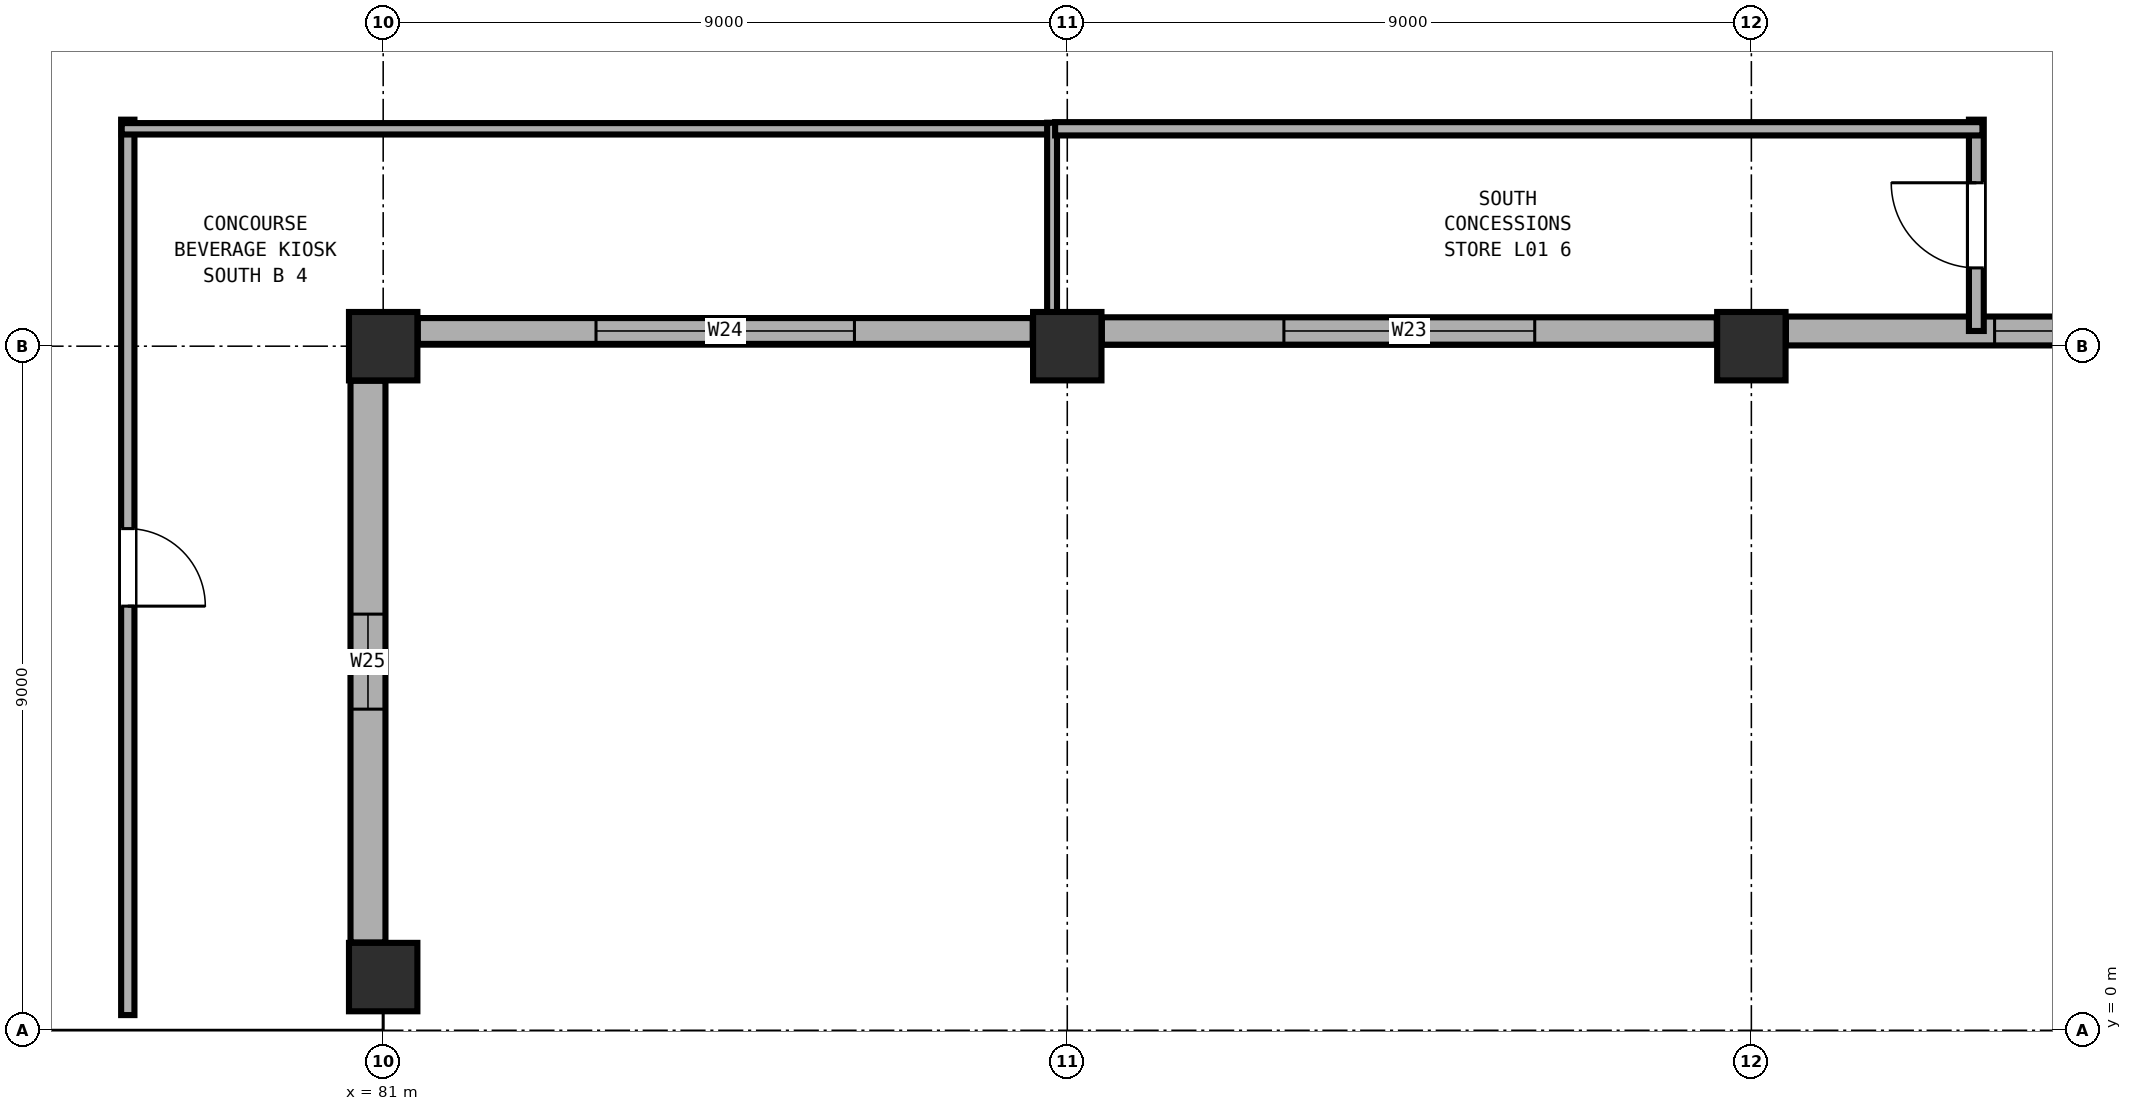
"""IFC4 building model, lengths in metres.
Left out: names, types, materials, properties, quantities, classifications, styles, units other than length and angle.
Written with IfcOpenShell. Run it as: python <this file> out.ifc"""

import sys

from ifc_helpers import new_model, si_unit, direction, frame, frame_2d, origin, origin_2d, place, context, subcontext, project, spatial, rectangle, extrude, element, fill, save


model = new_model("IFC4")
c1 = context("Model", 3, precision=1e-05, world=origin(), true_north=direction((0.0, 1.0)))
c2 = subcontext(c1, "Body", "Model", "MODEL_VIEW")
j1 = project(units=[si_unit("LENGTHUNIT", "METRE"), si_unit("PLANEANGLEUNIT", "RADIAN")], contexts=[c1])
p1 = place(None, origin())
s1 = spatial("IfcSite", under=j1, at=p1, CompositionType="ELEMENT")
p2 = place(p1, origin())
s2 = spatial("IfcBuilding", under=s1, at=p2, CompositionType="ELEMENT")
p3 = place(p2, frame((0.0, 0.0, 4.8)))
s3 = spatial("IfcBuildingStorey", under=s2, at=p3, CompositionType="ELEMENT", Elevation=4.8)
for number, where, z_axis, x_axis in (
    (1, (81.0, 0.7, 0.0), (0.0, 0.0, 1.0), (1.0, 0.0, 0.0)),
    (2, (81.0, 9.0, 0.0), (0.0, 0.0, 1.0), (1.0, 0.0, 0.0)),
    (3, (90.0, 9.0, 0.0), (0.0, 0.0, 1.0), (1.0, 0.0, 0.0)),
    (4, (99.0, 9.0, 0.0), (0.0, 0.0, 1.0), (1.0, 0.0, 0.0)),
):
    element("IfcColumn", number, at=place(p3, frame(where, z_axis=z_axis, x_axis=x_axis)), inside=s3, PredefinedType="COLUMN", context=c2, shape_type="SweptSolid", body=[
        extrude(rectangle(XDim=0.9, YDim=0.9, at=origin_2d()), origin(), (0.0, 0.0, 1.0), 4.8),
    ])
p4 = place(p3, frame((107.545, 9.2, 0.0), z_axis=(0.0, 0.0, 1.0), x_axis=(-1.0, 0.0, 0.0)))
e5 = element("IfcWall", 5, at=p4, inside=s3, PredefinedType="SOLIDWALL", context=c2, shape_type="SweptSolid", body=[
    extrude(rectangle(XDim=8.09, YDim=0.38, at=frame_2d((4.045, 0.0))), origin(), (0.0, 0.0, 1.0), 3.58),
])
p5 = place(p4, frame((2.145, 0.0, 0.9)))
e6 = element("IfcOpeningElement", 6, at=p5, cuts=e5, PredefinedType="OPENING", context=c2, shape_type="SweptSolid", body=[
    extrude(rectangle(XDim=3.2, YDim=2.05, at=frame_2d((1.6, 1.025))), frame((0.0, 0.2, 0.0), z_axis=(0.0, -1.0, 0.0), x_axis=(1.0, 0.0, 0.0)), (0.0, 0.0, 1.0), 0.4),
])
p6 = place(p3, frame((98.545, 9.2, 0.0), z_axis=(0.0, 0.0, 1.0), x_axis=(-1.0, 0.0, 0.0)))
e7 = element("IfcWall", 7, at=p6, inside=s3, PredefinedType="SOLIDWALL", context=c2, shape_type="SweptSolid", body=[
    extrude(rectangle(XDim=8.09, YDim=0.36, at=frame_2d((4.045, 0.0))), origin(), (0.0, 0.0, 1.0), 3.58),
])
p7 = place(p6, frame((2.395, 0.0, 0.9)))
e8 = element("IfcOpeningElement", 8, at=p7, cuts=e7, PredefinedType="OPENING", context=c2, shape_type="SweptSolid", body=[
    extrude(rectangle(XDim=3.3, YDim=2.0, at=frame_2d((1.65, 1.0))), frame((0.0, 0.19, 0.0), z_axis=(0.0, -1.0, 0.0), x_axis=(1.0, 0.0, 0.0)), (0.0, 0.0, 1.0), 0.38),
])
p8 = place(p3, frame((89.545, 9.2, 0.0), z_axis=(0.0, 0.0, 1.0), x_axis=(-1.0, 0.0, 0.0)))
e9 = element("IfcWall", 9, at=p8, inside=s3, PredefinedType="SOLIDWALL", context=c2, shape_type="SweptSolid", body=[
    extrude(rectangle(XDim=8.09, YDim=0.34, at=frame_2d((4.045, 0.0))), origin(), (0.0, 0.0, 1.0), 3.58),
])
p9 = place(p8, frame((2.345, 0.0, 0.9)))
e10 = element("IfcOpeningElement", 10, at=p9, cuts=e9, PredefinedType="OPENING", context=c2, shape_type="SweptSolid", body=[
    extrude(rectangle(XDim=3.4, YDim=1.95, at=frame_2d((1.7, 0.975))), frame((0.0, 0.18, 0.0), z_axis=(0.0, -1.0, 0.0), x_axis=(1.0, 0.0, 0.0)), (0.0, 0.0, 1.0), 0.36),
])
p10 = place(p3, frame((80.8, 8.545, 0.0), z_axis=(0.0, 0.0, 1.0), x_axis=(0.0, -1.0, 0.0)))
e11 = element("IfcWall", 11, at=p10, inside=s3, PredefinedType="SOLIDWALL", context=c2, shape_type="SweptSolid", body=[
    extrude(rectangle(XDim=7.39, YDim=0.46, at=frame_2d((3.695, 0.0))), origin(), (0.0, 0.0, 1.0), 3.58),
])
p11 = place(p10, frame((3.07, 0.0, 0.9)))
e12 = element("IfcOpeningElement", 12, at=p11, cuts=e11, PredefinedType="OPENING", context=c2, shape_type="SweptSolid", body=[
    extrude(rectangle(XDim=1.25, YDim=1.8, at=frame_2d((0.625, 0.9))), frame((0.0, 0.24, 0.0), z_axis=(0.0, -1.0, 0.0), x_axis=(1.0, 0.0, 0.0)), (0.0, 0.0, 1.0), 0.48),
])
p12 = place(p3, frame((80.545, 0.2, 0.0), z_axis=(0.0, 0.0, 1.0), x_axis=(-1.0, 0.0, 0.0)))
e13 = element("IfcWall", 13, at=p12, inside=s3, PredefinedType="SOLIDWALL", context=c2, shape_type="SweptSolid", body=[
    extrude(rectangle(XDim=8.09, YDim=0.42, at=frame_2d((4.045, 0.0))), origin(), (0.0, 0.0, 1.0), 3.58),
])
p13 = place(p12, frame((3.32, 0.0, 0.9)))
e14 = element("IfcOpeningElement", 14, at=p13, cuts=e13, PredefinedType="OPENING", context=c2, shape_type="SweptSolid", body=[
    extrude(rectangle(XDim=1.45, YDim=1.85, at=frame_2d((0.725, 0.925))), frame((0.0, 0.22, 0.0), z_axis=(0.0, -1.0, 0.0), x_axis=(1.0, 0.0, 0.0)), (0.0, 0.0, 1.0), 0.44),
])
p14 = place(p3, frame((77.64, 11.98, 0.0), z_axis=(0.0, 0.0, 1.0), x_axis=(0.0, -1.0, 0.0)))
e15 = element("IfcWall", 15, at=p14, inside=s3, PredefinedType="PARTITIONING", context=c2, shape_type="SweptSolid", body=[
    extrude(rectangle(XDim=11.78, YDim=0.175, at=frame_2d((5.89, 0.0))), origin(), (0.0, 0.0, 1.0), 3.28),
])
p15 = place(p14, frame((5.38, 0.0, 0.0)))
e16 = element("IfcOpeningElement", 16, at=p15, cuts=e15, PredefinedType="OPENING", context=c2, shape_type="SweptSolid", body=[
    extrude(rectangle(XDim=1.02, YDim=2.16, at=frame_2d((0.51, 1.08))), frame((0.0, 0.097, 0.0), z_axis=(0.0, -1.0, 0.0), x_axis=(1.0, 0.0, 0.0)), (0.0, 0.0, 1.0), 0.195),
])
p16 = place(p3, frame((77.56, 11.86, 0.0), z_axis=(0.0, 0.0, 1.0), x_axis=(1.0, 0.0, 0.0)))
e17 = element("IfcWall", 17, at=p16, inside=s3, PredefinedType="PARTITIONING", context=c2, shape_type="SweptSolid", body=[
    extrude(rectangle(XDim=12.2, YDim=0.15, at=frame_2d((6.1, 0.0))), origin(), (0.0, 0.0, 1.0), 3.28),
])
p17 = place(p3, frame((89.8, 11.94, 0.0), z_axis=(0.0, 0.0, 1.0), x_axis=(0.0, -1.0, 0.0)))
e18 = element("IfcWall", 18, at=p17, inside=s3, PredefinedType="PARTITIONING", context=c2, shape_type="SweptSolid", body=[
    extrude(rectangle(XDim=2.7, YDim=0.13, at=frame_2d((1.35, 0.0))), origin(), (0.0, 0.0, 1.0), 3.28),
])
p18 = place(p3, frame((101.96, 9.2, 0.0), z_axis=(0.0, 0.0, 1.0), x_axis=(0.0, 1.0, 0.0)))
e19 = element("IfcWall", 19, at=p18, inside=s3, PredefinedType="PARTITIONING", context=c2, shape_type="SweptSolid", body=[
    extrude(rectangle(XDim=2.78, YDim=0.195, at=frame_2d((1.39, 0.0))), origin(), (0.0, 0.0, 1.0), 3.28),
])
p19 = place(p18, frame((0.83, 0.0, 0.0)))
e20 = element("IfcOpeningElement", 20, at=p19, cuts=e19, PredefinedType="OPENING", context=c2, shape_type="SweptSolid", body=[
    extrude(rectangle(XDim=1.12, YDim=2.22, at=frame_2d((0.56, 1.11))), frame((0.0, 0.107, 0.0), z_axis=(0.0, -1.0, 0.0), x_axis=(1.0, 0.0, 0.0)), (0.0, 0.0, 1.0), 0.215),
])
p20 = place(p3, frame((89.84, 11.86, 0.0), z_axis=(0.0, 0.0, 1.0), x_axis=(1.0, 0.0, 0.0)))
e21 = element("IfcWall", 21, at=p20, inside=s3, PredefinedType="PARTITIONING", context=c2, shape_type="SweptSolid", body=[
    extrude(rectangle(XDim=12.2, YDim=0.175, at=frame_2d((6.1, 0.0))), origin(), (0.0, 0.0, 1.0), 3.28),
])
p21 = place(p5, origin())
e22 = element("IfcWindow", 22, at=p21, inside=s3, PartitioningType="DOUBLE_PANEL_VERTICAL", PredefinedType="WINDOW", context=c2, shape_type="SweptSolid", body=[
    extrude(rectangle(XDim=3.2, YDim=2.05, at=frame_2d((1.6, 1.025))), frame((0.0, 0.03, 0.0), z_axis=(0.0, -1.0, 0.0), x_axis=(1.0, 0.0, 0.0)), (0.0, 0.0, 1.0), 0.06),
])
fill(e6, e22)
p22 = place(p7, origin())
e23 = element("IfcWindow", 23, at=p22, inside=s3, PartitioningType="DOUBLE_PANEL_VERTICAL", PredefinedType="WINDOW", context=c2, shape_type="SweptSolid", body=[
    extrude(rectangle(XDim=3.3, YDim=2.0, at=frame_2d((1.65, 1.0))), frame((0.0, 0.03, 0.0), z_axis=(0.0, -1.0, 0.0), x_axis=(1.0, 0.0, 0.0)), (0.0, 0.0, 1.0), 0.06),
])
fill(e8, e23)
p23 = place(p9, origin())
e24 = element("IfcWindow", 24, at=p23, inside=s3, PartitioningType="DOUBLE_PANEL_VERTICAL", PredefinedType="WINDOW", context=c2, shape_type="SweptSolid", body=[
    extrude(rectangle(XDim=3.4, YDim=1.95, at=frame_2d((1.7, 0.975))), frame((0.0, 0.03, 0.0), z_axis=(0.0, -1.0, 0.0), x_axis=(1.0, 0.0, 0.0)), (0.0, 0.0, 1.0), 0.06),
])
fill(e10, e24)
p24 = place(p11, origin())
e25 = element("IfcWindow", 25, at=p24, inside=s3, PartitioningType="SINGLE_PANEL", PredefinedType="WINDOW", context=c2, shape_type="SweptSolid", body=[
    extrude(rectangle(XDim=1.25, YDim=1.8, at=frame_2d((0.625, 0.9))), frame((0.0, 0.03, 0.0), z_axis=(0.0, -1.0, 0.0), x_axis=(1.0, 0.0, 0.0)), (0.0, 0.0, 1.0), 0.06),
])
fill(e12, e25)
p25 = place(p13, origin())
e26 = element("IfcWindow", 26, at=p25, inside=s3, PartitioningType="SINGLE_PANEL", PredefinedType="WINDOW", context=c2, shape_type="SweptSolid", body=[
    extrude(rectangle(XDim=1.45, YDim=1.85, at=frame_2d((0.725, 0.925))), frame((0.0, 0.03, 0.0), z_axis=(0.0, -1.0, 0.0), x_axis=(1.0, 0.0, 0.0)), (0.0, 0.0, 1.0), 0.06),
])
fill(e14, e26)
p26 = place(p15, origin())
e27 = element("IfcDoor", 27, at=p26, inside=s3, OperationType="SINGLE_SWING_RIGHT", PredefinedType="DOOR", context=c2, shape_type="SweptSolid", body=[
    extrude(rectangle(XDim=1.02, YDim=2.16, at=frame_2d((0.51, 1.08))), frame((0.0, 0.025, 0.0), z_axis=(0.0, -1.0, 0.0), x_axis=(1.0, 0.0, 0.0)), (0.0, 0.0, 1.0), 0.05),
])
fill(e16, e27)
p27 = place(p19, origin())
e28 = element("IfcDoor", 28, at=p27, inside=s3, OperationType="SINGLE_SWING_RIGHT", PredefinedType="DOOR", context=c2, shape_type="SweptSolid", body=[
    extrude(rectangle(XDim=1.12, YDim=2.22, at=frame_2d((0.56, 1.11))), frame((0.0, 0.025, 0.0), z_axis=(0.0, -1.0, 0.0), x_axis=(1.0, 0.0, 0.0)), (0.0, 0.0, 1.0), 0.05),
])
fill(e20, e28)
save(model, sys.argv[1])
